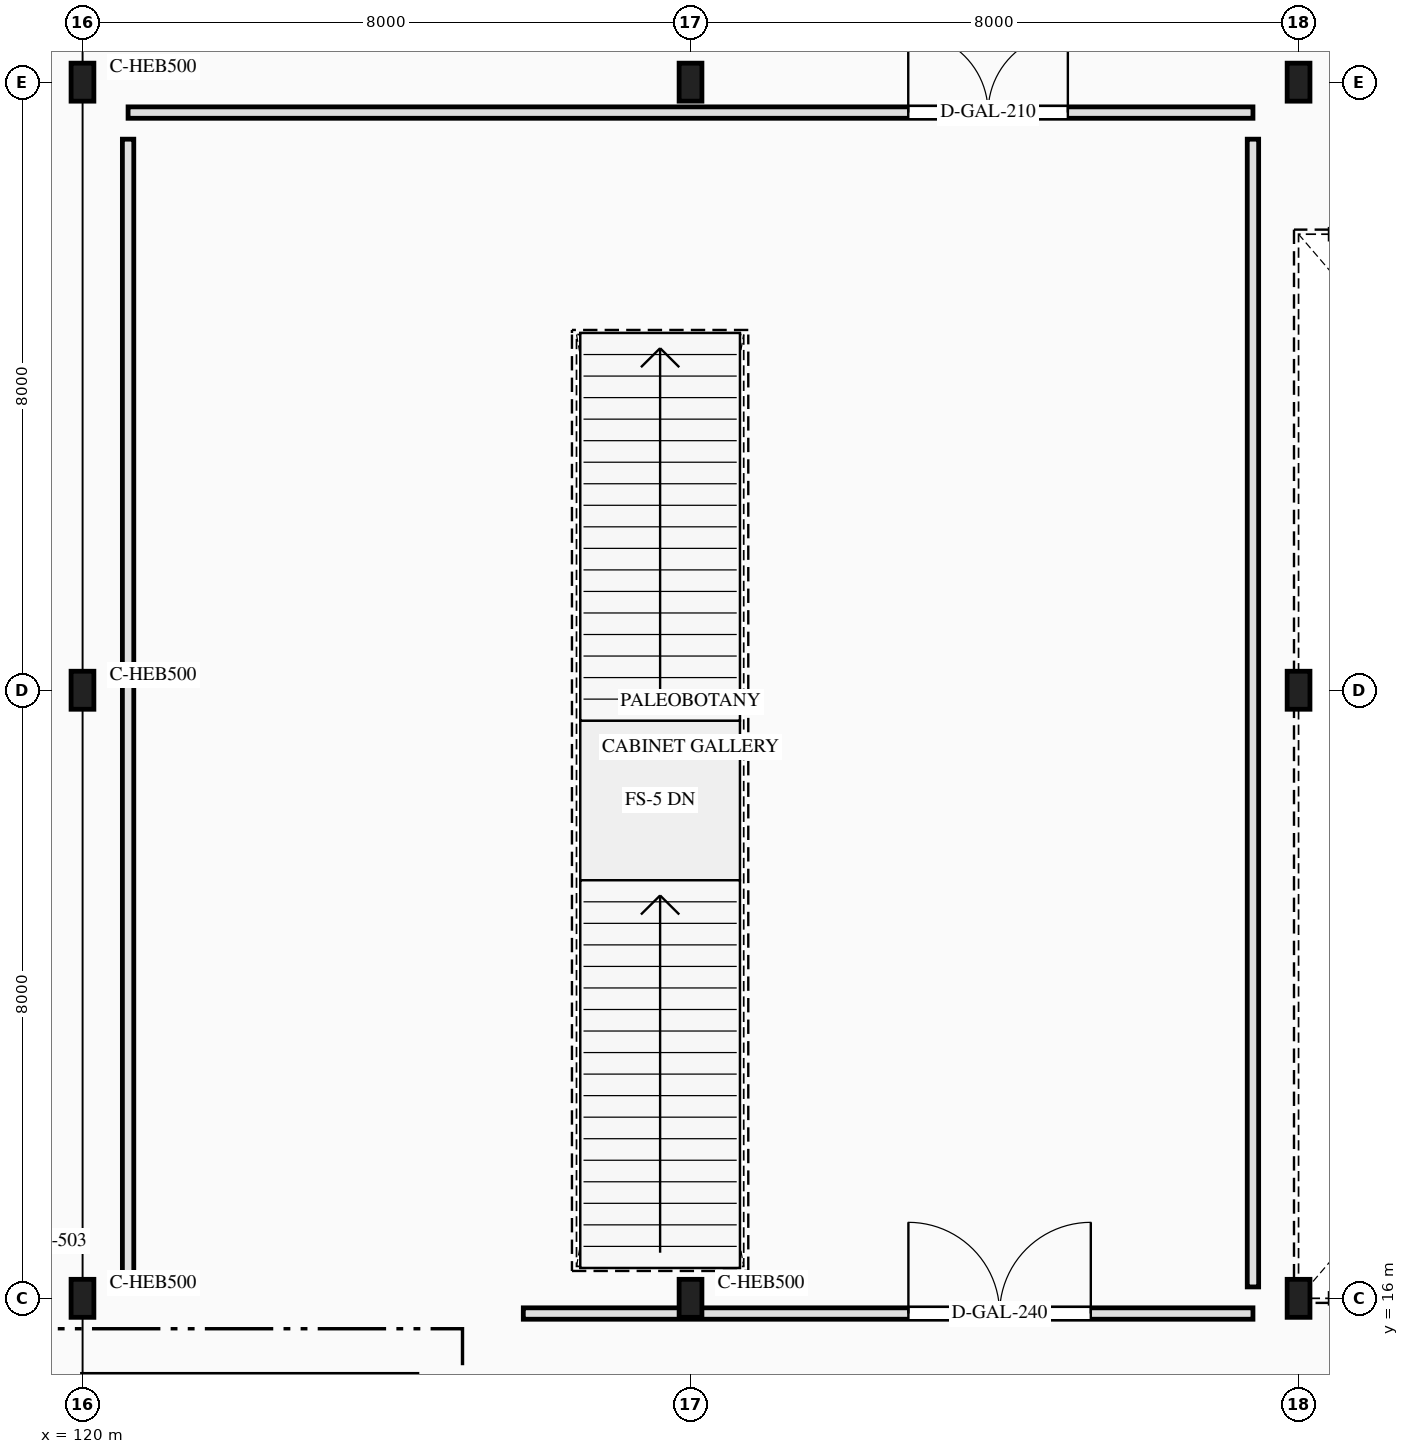
"""IFC4 building model, lengths in metres.
Left out: names, types, materials, properties, quantities, classifications, styles, units other than length and angle.
Written with IfcOpenShell. Run it as: python <this file> out.ifc"""

import sys

from ifc_helpers import new_model, si_unit, direction, frame, frame_2d, origin, origin_2d, place, context, subcontext, project, spatial, rectangle, i_section, extrude, element, fill, save


model = new_model("IFC4")
c1 = context("Model", 3, precision=1e-05, world=origin(), true_north=direction((0.0, 1.0)))
c2 = subcontext(c1, "Body", "Model", "MODEL_VIEW")
j1 = project(units=[si_unit("LENGTHUNIT", "METRE"), si_unit("PLANEANGLEUNIT", "RADIAN")], contexts=[c1])
p1 = place(None, origin())
s1 = spatial("IfcSite", under=j1, at=p1, CompositionType="ELEMENT")
p2 = place(p1, origin())
s2 = spatial("IfcBuilding", under=s1, at=p2, CompositionType="ELEMENT")
p3 = place(p2, frame((0.0, 0.0, 5.4)))
s3 = spatial("IfcBuildingStorey", under=s2, at=p3, CompositionType="ELEMENT", Elevation=5.4)
p4 = place(p3, frame((120.0, 14.85, 0.0), z_axis=(0.0, 0.0, 1.0), x_axis=(1.0, 0.0, 0.0)))
e1 = element("IfcWall", 1, at=p4, inside=s3, PredefinedType="SHEAR", context=c2, shape_type="SweptSolid", body=[
    extrude(rectangle(XDim=4.4, YDim=0.3, at=frame_2d((2.2, 0.0))), origin(), (0.0, 0.0, 1.0), 4.2),
])
for number, where, z_axis, x_axis in (
    (2, (120.0, 16.0, 0.0), (0.0, 0.0, 1.0), (1.0, 0.0, 0.0)),
    (3, (120.0, 24.0, 0.0), (0.0, 0.0, 1.0), (1.0, 0.0, 0.0)),
    (4, (120.0, 32.0, 0.0), (0.0, 0.0, 1.0), (1.0, 0.0, 0.0)),
    (5, (128.0, 16.0, 0.0), (0.0, 0.0, 1.0), (1.0, 0.0, 0.0)),
    (6, (128.0, 32.0, 0.0), (0.0, 0.0, 1.0), (1.0, 0.0, 0.0)),
    (7, (136.0, 16.0, 0.0), (0.0, 0.0, 1.0), (1.0, 0.0, 0.0)),
    (8, (136.0, 24.0, 0.0), (0.0, 0.0, 1.0), (1.0, 0.0, 0.0)),
    (9, (136.0, 32.0, 0.0), (0.0, 0.0, 1.0), (1.0, 0.0, 0.0)),
):
    element("IfcColumn", number, at=place(p3, frame(where, z_axis=z_axis, x_axis=x_axis)), inside=s3, PredefinedType="COLUMN", context=c2, shape_type="SweptSolid", body=[
        extrude(i_section(OverallWidth=0.3, OverallDepth=0.5, WebThickness=0.014, FlangeThickness=0.028, FilletRadius=0.027, at=origin_2d()), origin(), (0.0, 0.0, 1.0), 4.2),
    ])
p5 = place(p3, frame((120.6, 31.6, 0.0), z_axis=(0.0, 0.0, 1.0), x_axis=(1.0, 0.0, 0.0)))
e10 = element("IfcWall", 10, at=p5, inside=s3, PredefinedType="PARTITIONING", context=c2, shape_type="SweptSolid", body=[
    extrude(rectangle(XDim=14.8, YDim=0.15, at=frame_2d((7.4, 0.0))), origin(), (0.0, 0.0, 1.0), 3.92),
])
p6 = place(p5, frame((10.265, 0.0, 0.0)))
e11 = element("IfcOpeningElement", 11, at=p6, cuts=e10, PredefinedType="OPENING", context=c2, shape_type="SweptSolid", body=[
    extrude(rectangle(XDim=2.1, YDim=2.6, at=frame_2d((1.05, 1.3))), frame((0.0, 0.085, 0.0), z_axis=(0.0, -1.0, 0.0), x_axis=(1.0, 0.0, 0.0)), (0.0, 0.0, 1.0), 0.17),
])
p7 = place(p3, frame((125.8, 15.8, 0.0), z_axis=(0.0, 0.0, 1.0), x_axis=(1.0, 0.0, 0.0)))
e12 = element("IfcWall", 12, at=p7, inside=s3, PredefinedType="PARTITIONING", context=c2, shape_type="SweptSolid", body=[
    extrude(rectangle(XDim=9.6, YDim=0.15, at=frame_2d((4.8, 0.0))), origin(), (0.0, 0.0, 1.0), 3.38),
])
p8 = place(p7, frame((5.067, 0.0, 0.0)))
e13 = element("IfcOpeningElement", 13, at=p8, cuts=e12, PredefinedType="OPENING", context=c2, shape_type="SweptSolid", body=[
    extrude(rectangle(XDim=2.4, YDim=2.75, at=frame_2d((1.2, 1.375))), frame((0.0, 0.085, 0.0), z_axis=(0.0, -1.0, 0.0), x_axis=(1.0, 0.0, 0.0)), (0.0, 0.0, 1.0), 0.17),
])
for number, where, z_axis, x_axis in (
    (14, (120.6, 16.15, 0.0), (0.0, 0.0, 1.0), (0.0, 1.0, 0.0)),
    (15, (135.4, 16.15, 0.0), (0.0, 0.0, 1.0), (0.0, 1.0, 0.0)),
):
    element("IfcWall", number, at=place(p3, frame(where, z_axis=z_axis, x_axis=x_axis)), inside=s3, PredefinedType="PARTITIONING", context=c2, shape_type="SweptSolid", body=[
        extrude(rectangle(XDim=15.1, YDim=0.15, at=frame_2d((7.55, 0.0))), origin(), (0.0, 0.0, 1.0), 3.92),
    ])
p9 = place(p6, origin())
e16 = element("IfcDoor", 16, at=p9, inside=s3, OperationType="DOUBLE_DOOR_SINGLE_SWING", PredefinedType="DOOR", context=c2, shape_type="SweptSolid", body=[
    extrude(rectangle(XDim=2.1, YDim=2.6, at=frame_2d((1.05, 1.3))), frame((0.0, 0.025, 0.0), z_axis=(0.0, -1.0, 0.0), x_axis=(1.0, 0.0, 0.0)), (0.0, 0.0, 1.0), 0.05),
])
fill(e11, e16)
p10 = place(p8, origin())
e17 = element("IfcDoor", 17, at=p10, inside=s3, OperationType="DOUBLE_DOOR_DOUBLE_SWING", PredefinedType="DOOR", context=c2, shape_type="SweptSolid", body=[
    extrude(rectangle(XDim=2.4, YDim=2.75, at=frame_2d((1.2, 1.375))), frame((0.0, 0.025, 0.0), z_axis=(0.0, -1.0, 0.0), x_axis=(1.0, 0.0, 0.0)), (0.0, 0.0, 1.0), 0.05),
])
fill(e13, e17)
save(model, sys.argv[1])
